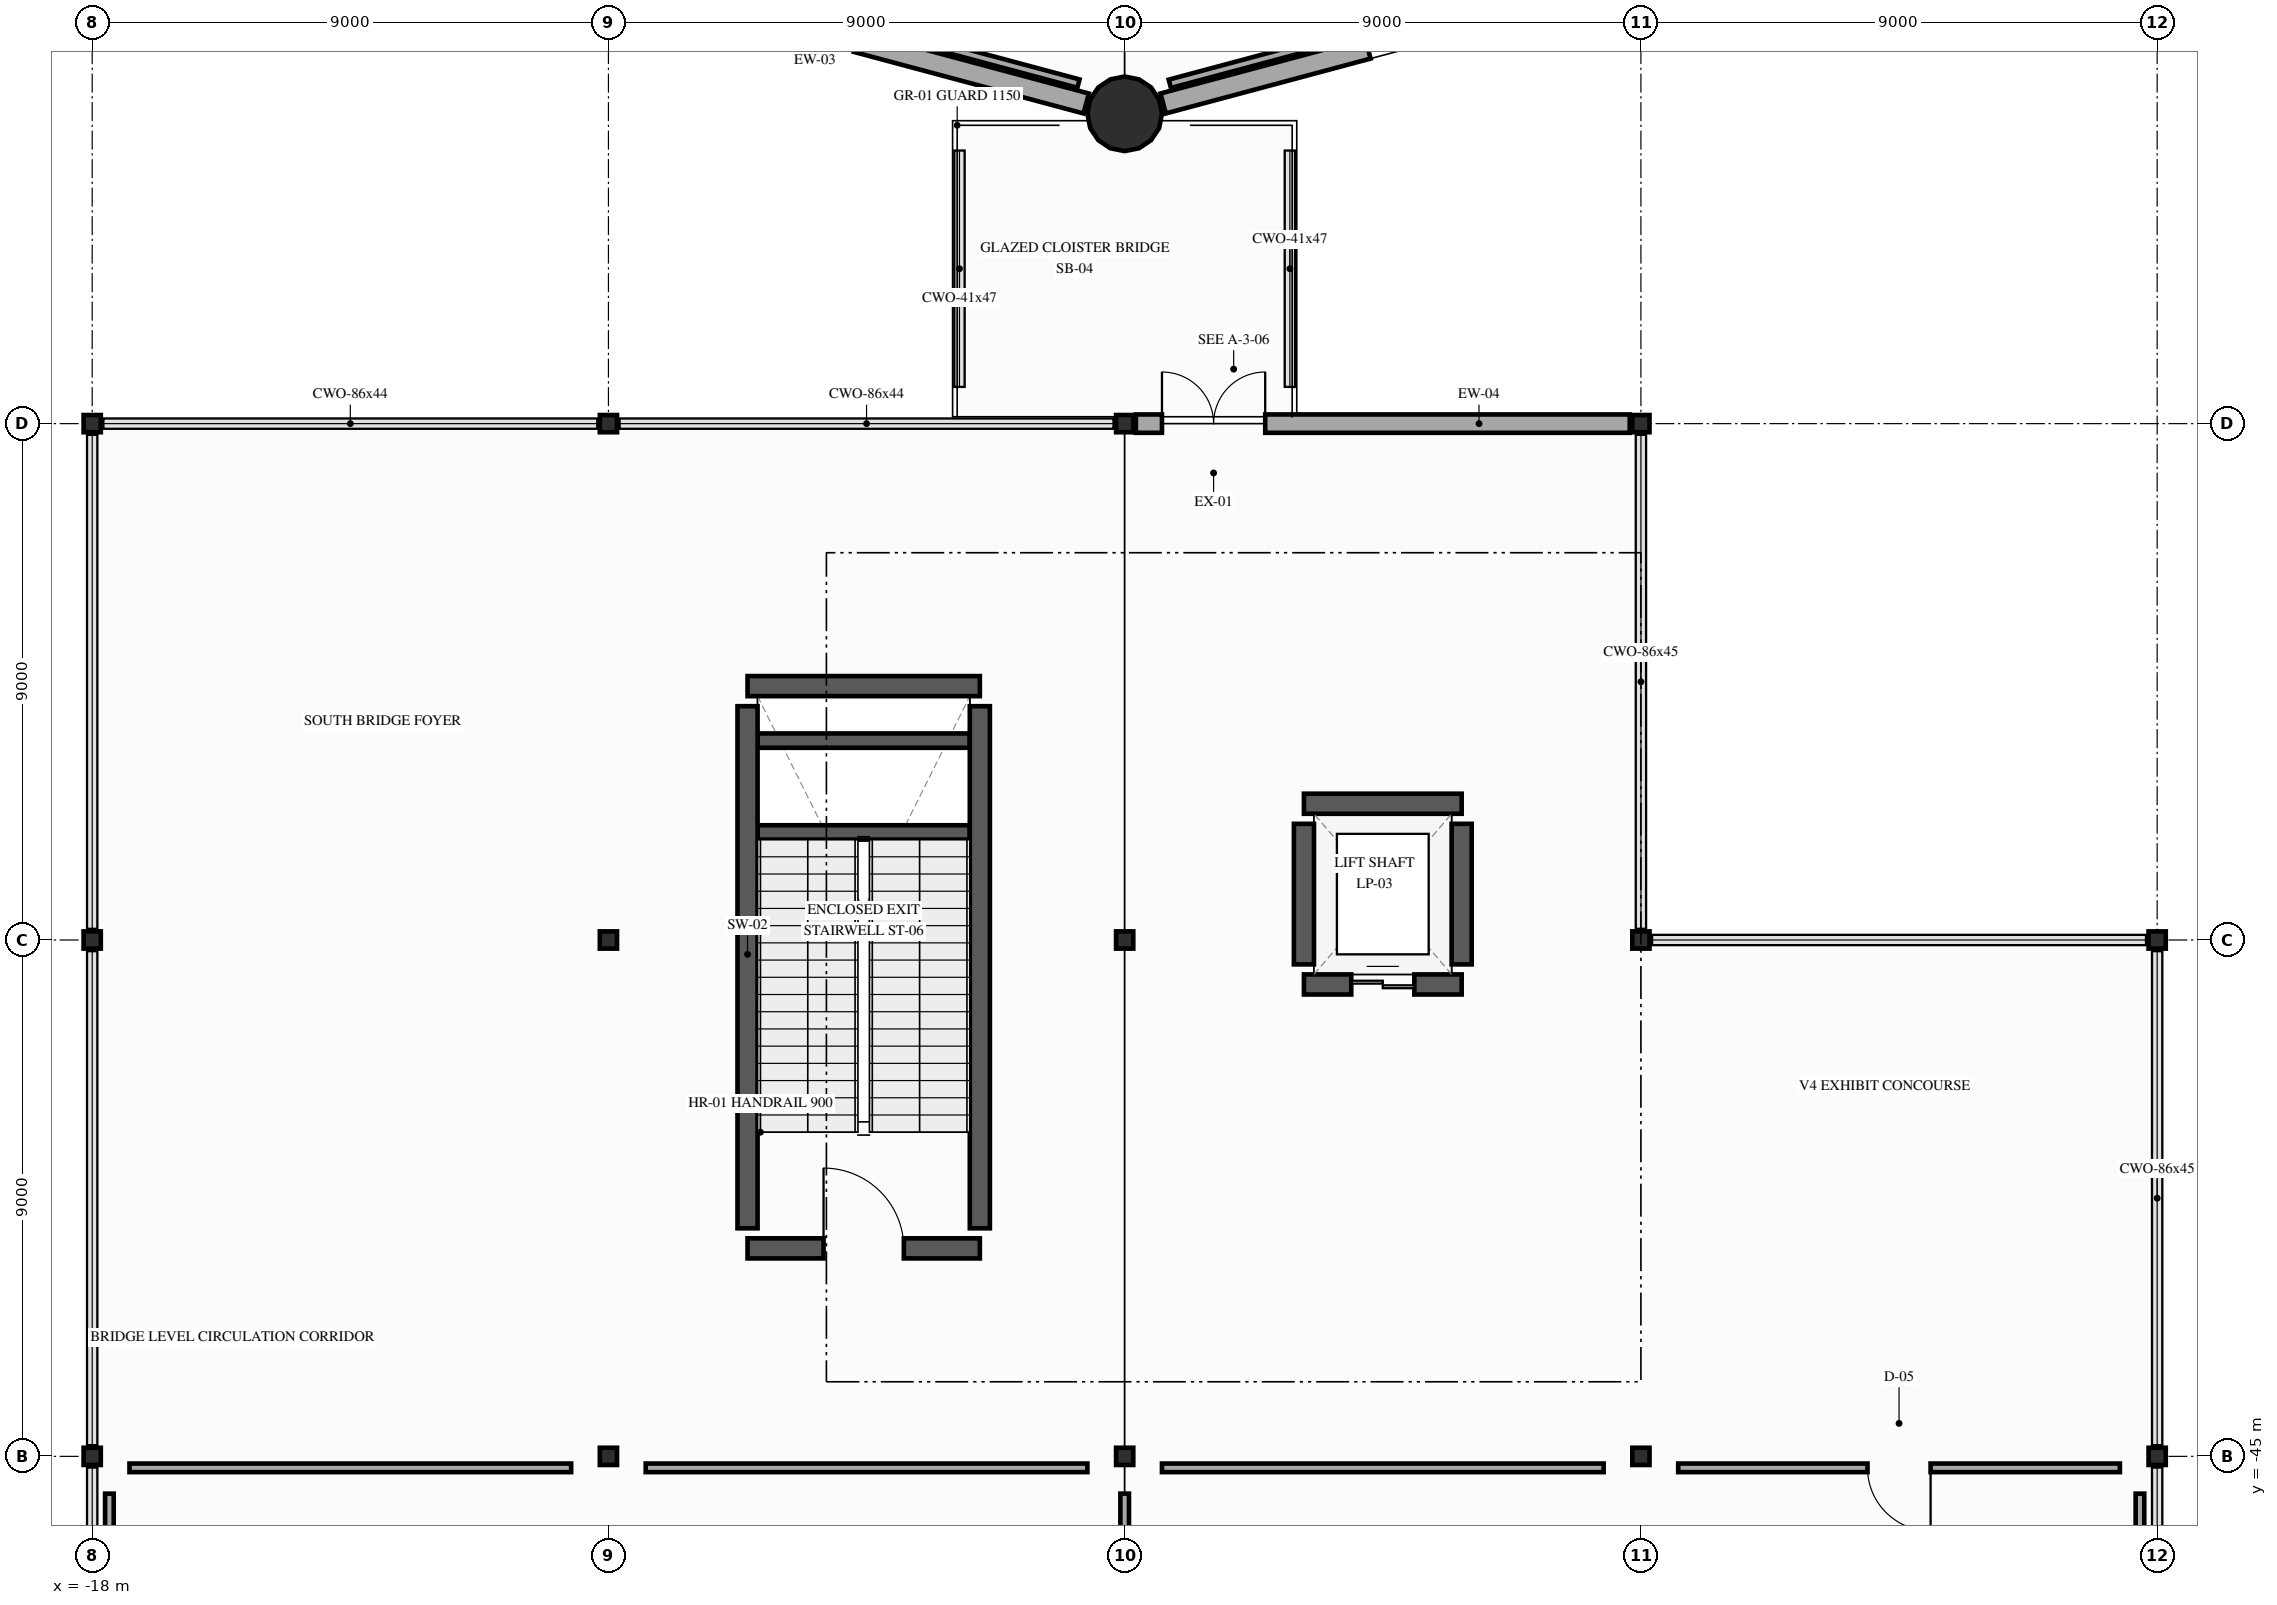
"""IFC4 building model, lengths in metres.
Left out: names, types, materials, properties, quantities, classifications, styles, units other than length and angle.
Written with IfcOpenShell. Run it as: python <this file> out.ifc"""

import sys

from ifc_helpers import new_model, si_unit, direction, frame, frame_2d, origin, origin_2d, place, context, subcontext, project, spatial, rectangle, circle, i_section, extrude, element, fill, save


model = new_model("IFC4")
c1 = context("Model", 3, precision=1e-05, world=origin(), true_north=direction((0.0, 1.0)))
c2 = subcontext(c1, "Body", "Model", "MODEL_VIEW")
j1 = project(units=[si_unit("LENGTHUNIT", "METRE"), si_unit("PLANEANGLEUNIT", "RADIAN")], contexts=[c1])
p1 = place(None, origin())
s1 = spatial("IfcSite", under=j1, at=p1, CompositionType="ELEMENT")
p2 = place(p1, origin())
s2 = spatial("IfcBuilding", under=s1, at=p2, CompositionType="ELEMENT")
p3 = place(p2, frame((0.0, 0.0, 10.8)))
s3 = spatial("IfcBuildingStorey", under=s2, at=p3, CompositionType="ELEMENT", Elevation=10.8)
p4 = place(p3, frame((0.0, -21.6, 0.0), z_axis=(0.0, 0.0, 1.0), x_axis=(0.0, -1.0, 0.0)))
e1 = element("IfcColumn", 1, at=p4, inside=s3, PredefinedType="COLUMN", context=c2, shape_type="SweptSolid", body=[
    extrude(circle(Radius=0.65, at=origin_2d()), origin(), (0.0, 0.0, 1.0), 5.4),
])
for number, where, z_axis, x_axis in (
    (2, (-18.0, -45.0, 0.0), (0.0, 0.0, 1.0), (1.0, 0.0, 0.0)),
    (3, (-18.0, -36.0, 0.0), (0.0, 0.0, 1.0), (1.0, 0.0, 0.0)),
    (4, (-18.0, -27.0, 0.0), (0.0, 0.0, 1.0), (1.0, 0.0, 0.0)),
    (5, (-9.0, -45.0, 0.0), (0.0, 0.0, 1.0), (1.0, 0.0, 0.0)),
    (6, (-9.0, -36.0, 0.0), (0.0, 0.0, 1.0), (1.0, 0.0, 0.0)),
    (7, (-9.0, -27.0, 0.0), (0.0, 0.0, 1.0), (1.0, 0.0, 0.0)),
    (8, (0.0, -45.0, 0.0), (0.0, 0.0, 1.0), (1.0, 0.0, 0.0)),
    (9, (0.0, -36.0, 0.0), (0.0, 0.0, 1.0), (1.0, 0.0, 0.0)),
    (10, (0.0, -27.0, 0.0), (0.0, 0.0, 1.0), (1.0, 0.0, 0.0)),
    (11, (9.0, -45.0, 0.0), (0.0, 0.0, 1.0), (1.0, 0.0, 0.0)),
    (12, (9.0, -36.0, 0.0), (0.0, 0.0, 1.0), (1.0, 0.0, 0.0)),
    (13, (9.0, -27.0, 0.0), (0.0, 0.0, 1.0), (1.0, 0.0, 0.0)),
    (14, (18.0, -45.0, 0.0), (0.0, 0.0, 1.0), (1.0, 0.0, 0.0)),
    (15, (18.0, -36.0, 0.0), (0.0, 0.0, 1.0), (1.0, 0.0, 0.0)),
):
    element("IfcColumn", number, at=place(p3, frame(where, z_axis=z_axis, x_axis=x_axis)), inside=s3, PredefinedType="COLUMN", context=c2, shape_type="SweptSolid", body=[
        extrude(i_section(OverallWidth=0.3, OverallDepth=0.3, WebThickness=0.01, FlangeThickness=0.015, FilletRadius=0.018, at=origin_2d()), origin(), (0.0, 0.0, 1.0), 5.4),
    ])
p5 = place(p3, frame((-0.671, -21.42, 0.0), z_axis=(0.0, 0.0, 1.0), x_axis=(-0.965934251614, 0.258787599316, 0.0)))
e16 = element("IfcWall", 16, at=p5, inside=s3, PredefinedType="SOLIDWALL", context=c2, shape_type="SweptSolid", body=[
    extrude(rectangle(XDim=9.792, YDim=0.36, at=frame_2d((4.896, 0.0))), origin(), (0.0, 0.0, 1.0), 4.395),
])
p6 = place(p5, frame((4.146, 0.0, 0.9)))
e17 = element("IfcOpeningElement", 17, at=p6, cuts=e16, PredefinedType="OPENING", context=c2, shape_type="SweptSolid", body=[
    extrude(rectangle(XDim=1.5, YDim=2.4, at=frame_2d((0.75, 1.2))), frame((0.0, 0.19, 0.0), z_axis=(0.0, -1.0, 0.0), x_axis=(1.0, 0.0, 0.0)), (0.0, 0.0, 1.0), 0.38),
])
p7 = place(p3, frame((10.129, -18.886, 0.0), z_axis=(0.0, 0.0, 1.0), x_axis=(-0.965934251614, -0.258787599316, 0.0)))
e18 = element("IfcWall", 18, at=p7, inside=s3, PredefinedType="SOLIDWALL", context=c2, shape_type="SweptSolid", body=[
    extrude(rectangle(XDim=9.792, YDim=0.36, at=frame_2d((4.896, 0.0))), origin(), (0.0, 0.0, 1.0), 4.395),
])
p8 = place(p7, frame((3.696, 0.0, 0.9)))
e19 = element("IfcOpeningElement", 19, at=p8, cuts=e18, PredefinedType="OPENING", context=c2, shape_type="SweptSolid", body=[
    extrude(rectangle(XDim=2.4, YDim=2.4, at=frame_2d((1.2, 1.2))), frame((0.0, 0.19, 0.0), z_axis=(0.0, -1.0, 0.0), x_axis=(1.0, 0.0, 0.0)), (0.0, 0.0, 1.0), 0.38),
])
p9 = place(p3, frame((0.195, -27.0, 0.0), z_axis=(0.0, 0.0, 1.0), x_axis=(1.0, 0.0, 0.0)))
e20 = element("IfcWall", 20, at=p9, inside=s3, PredefinedType="SOLIDWALL", context=c2, shape_type="SweptSolid", body=[
    extrude(rectangle(XDim=8.61, YDim=0.32, at=frame_2d((4.305, 0.0))), origin(), (0.0, 0.0, 1.0), 4.447),
])
p10 = place(p9, frame((0.455, 0.0, 0.0)))
e21 = element("IfcOpeningElement", 21, at=p10, cuts=e20, PredefinedType="OPENING", context=c2, shape_type="SweptSolid", body=[
    extrude(rectangle(XDim=1.8, YDim=2.2, at=frame_2d((0.9, 1.1))), frame((0.0, 0.17, 0.0), z_axis=(0.0, -1.0, 0.0), x_axis=(1.0, 0.0, 0.0)), (0.0, 0.0, 1.0), 0.34),
])
for number, where, z_axis, x_axis in (
    (22, (-6.4, -34.125, 0.0), (0.0, 0.0, 1.0), (1.0, 0.0, 0.0)),
    (23, (-6.4, -32.525, 0.0), (0.0, 0.0, 1.0), (1.0, 0.0, 0.0)),
):
    element("IfcWall", number, at=place(p3, frame(where, z_axis=z_axis, x_axis=x_axis)), inside=s3, PredefinedType="SHEAR", context=c2, shape_type="SweptSolid", body=[
        extrude(rectangle(XDim=3.7, YDim=0.25, at=frame_2d((1.85, 0.0))), origin(), (0.0, 0.0, 1.0), 2.5),
    ])
p11 = place(p3, frame((-6.575, -41.375, 0.0), z_axis=(0.0, 0.0, 1.0), x_axis=(1.0, 0.0, 0.0)))
e24 = element("IfcWall", 24, at=p11, inside=s3, PredefinedType="SHEAR", context=c2, shape_type="SweptSolid", body=[
    extrude(rectangle(XDim=4.05, YDim=0.35, at=frame_2d((2.025, 0.0))), origin(), (0.0, 0.0, 1.0), 5.16),
])
p12 = place(p11, frame((1.325, 0.0, 0.0)))
e25 = element("IfcOpeningElement", 25, at=p12, cuts=e24, PredefinedType="OPENING", context=c2, shape_type="SweptSolid", body=[
    extrude(rectangle(XDim=1.4, YDim=2.2, at=frame_2d((0.7, 1.1))), frame((0.0, 0.185, 0.0), z_axis=(0.0, -1.0, 0.0), x_axis=(1.0, 0.0, 0.0)), (0.0, 0.0, 1.0), 0.37),
])
p13 = place(p3, frame((-6.575, -31.575, 0.0), z_axis=(0.0, 0.0, 1.0), x_axis=(1.0, 0.0, 0.0)))
e26 = element("IfcWall", 26, at=p13, inside=s3, PredefinedType="SHEAR", context=c2, shape_type="SweptSolid", body=[
    extrude(rectangle(XDim=4.05, YDim=0.35, at=frame_2d((2.025, 0.0))), origin(), (0.0, 0.0, 1.0), 5.16),
])
for number, where, z_axis, x_axis in (
    (27, (-6.575, -41.025, 0.0), (0.0, 0.0, 1.0), (0.0, 1.0, 0.0)),
    (28, (-2.525, -41.025, 0.0), (0.0, 0.0, 1.0), (0.0, 1.0, 0.0)),
):
    element("IfcWall", number, at=place(p3, frame(where, z_axis=z_axis, x_axis=x_axis)), inside=s3, PredefinedType="SHEAR", context=c2, shape_type="SweptSolid", body=[
        extrude(rectangle(XDim=9.1, YDim=0.35, at=frame_2d((4.55, 0.0))), origin(), (0.0, 0.0, 1.0), 5.16),
    ])
p14 = place(p3, frame((3.125, -36.775, 0.0), z_axis=(0.0, 0.0, 1.0), x_axis=(1.0, 0.0, 0.0)))
e29 = element("IfcWall", 29, at=p14, inside=s3, PredefinedType="SHEAR", context=c2, shape_type="SweptSolid", body=[
    extrude(rectangle(XDim=2.75, YDim=0.35, at=frame_2d((1.375, 0.0))), origin(), (0.0, 0.0, 1.0), 5.16),
])
p15 = place(p14, frame((0.825, 0.0, 0.0)))
e30 = element("IfcOpeningElement", 30, at=p15, cuts=e29, PredefinedType="OPENING", context=c2, shape_type="SweptSolid", body=[
    extrude(rectangle(XDim=1.1, YDim=2.2, at=frame_2d((0.55, 1.1))), frame((0.0, 0.185, 0.0), z_axis=(0.0, -1.0, 0.0), x_axis=(1.0, 0.0, 0.0)), (0.0, 0.0, 1.0), 0.37),
])
p16 = place(p3, frame((5.875, -33.625, 0.0), z_axis=(0.0, 0.0, 1.0), x_axis=(-1.0, 0.0, 0.0)))
e31 = element("IfcWall", 31, at=p16, inside=s3, PredefinedType="SHEAR", context=c2, shape_type="SweptSolid", body=[
    extrude(rectangle(XDim=2.75, YDim=0.35, at=frame_2d((1.375, 0.0))), origin(), (0.0, 0.0, 1.0), 5.16),
])
for number, where, z_axis, x_axis in (
    (32, (3.125, -36.425, 0.0), (0.0, 0.0, 1.0), (0.0, 1.0, 0.0)),
    (33, (5.875, -36.425, 0.0), (0.0, 0.0, 1.0), (0.0, 1.0, 0.0)),
):
    element("IfcWall", number, at=place(p3, frame(where, z_axis=z_axis, x_axis=x_axis)), inside=s3, PredefinedType="SHEAR", context=c2, shape_type="SweptSolid", body=[
        extrude(rectangle(XDim=2.45, YDim=0.35, at=frame_2d((1.225, 0.0))), origin(), (0.0, 0.0, 1.0), 5.16),
    ])
p17 = place(p3, frame((-10.04, -18.599, 0.0), z_axis=(0.0, 0.0, 1.0), x_axis=(0.965936310931, -0.258779912716, 0.0)))
e34 = element("IfcWall", 34, at=p17, inside=s3, PredefinedType="PARTITIONING", context=c2, shape_type="SweptSolid", body=[
    extrude(rectangle(XDim=9.56, YDim=0.15, at=frame_2d((4.78, 0.0))), origin(), (0.0, 0.0, 1.0), 4.395),
])
p18 = place(p3, frame((0.787, -21.077, 0.0), z_axis=(0.0, 0.0, 1.0), x_axis=(0.965965793981, 0.258669837549, 0.0)))
e35 = element("IfcWall", 35, at=p18, inside=s3, PredefinedType="PARTITIONING", context=c2, shape_type="SweptSolid", body=[
    extrude(rectangle(XDim=9.579, YDim=0.15, at=frame_2d((4.79, 0.0))), origin(), (0.0, 0.0, 1.0), 4.395),
])
p19 = place(p3, frame((0.0, -55.15, 0.0), z_axis=(0.0, 0.0, 1.0), x_axis=(0.0, 1.0, 0.0)))
e36 = element("IfcWall", 36, at=p19, inside=s3, PredefinedType="PARTITIONING", context=c2, shape_type="SweptSolid", body=[
    extrude(rectangle(XDim=9.5, YDim=0.15, at=frame_2d((4.75, 0.0))), origin(), (0.0, 0.0, 1.0), 4.535),
])
p20 = place(p19, frame((3.85, 0.0, 0.0)))
e37 = element("IfcOpeningElement", 37, at=p20, cuts=e36, PredefinedType="OPENING", context=c2, shape_type="SweptSolid", body=[
    extrude(rectangle(XDim=1.8, YDim=2.3, at=frame_2d((0.9, 1.15))), frame((0.0, 0.085, 0.0), z_axis=(0.0, -1.0, 0.0), x_axis=(1.0, 0.0, 0.0)), (0.0, 0.0, 1.0), 0.17),
])
for number, where, z_axis, x_axis in (
    (38, (-0.65, -45.2, 0.0), (0.0, 0.0, 1.0), (-1.0, 0.0, 0.0)),
    (39, (-9.65, -45.2, 0.0), (0.0, 0.0, 1.0), (-1.0, 0.0, 0.0)),
):
    element("IfcWall", number, at=place(p3, frame(where, z_axis=z_axis, x_axis=x_axis)), inside=s3, PredefinedType="PARTITIONING", context=c2, shape_type="SweptSolid", body=[
        extrude(rectangle(XDim=7.7, YDim=0.15, at=frame_2d((3.85, 0.0))), origin(), (0.0, 0.0, 1.0), 4.447),
    ])
for number, where, z_axis, x_axis in (
    (40, (-17.7, -45.65, 0.0), (0.0, 0.0, 1.0), (0.0, -1.0, 0.0)),
    (41, (17.7, -55.15, 0.0), (0.0, 0.0, 1.0), (0.0, 1.0, 0.0)),
):
    element("IfcWall", number, at=place(p3, frame(where, z_axis=z_axis, x_axis=x_axis)), inside=s3, PredefinedType="PARTITIONING", context=c2, shape_type="SweptSolid", body=[
        extrude(rectangle(XDim=9.5, YDim=0.15, at=frame_2d((4.75, 0.0))), origin(), (0.0, 0.0, 1.0), 4.535),
    ])
p21 = place(p3, frame((17.35, -45.2, 0.0), z_axis=(0.0, 0.0, 1.0), x_axis=(-1.0, 0.0, 0.0)))
e42 = element("IfcWall", 42, at=p21, inside=s3, PredefinedType="PARTITIONING", context=c2, shape_type="SweptSolid", body=[
    extrude(rectangle(XDim=7.7, YDim=0.15, at=frame_2d((3.85, 0.0))), origin(), (0.0, 0.0, 1.0), 4.447),
])
p22 = place(p21, frame((3.3, 0.0, 0.0)))
e43 = element("IfcOpeningElement", 43, at=p22, cuts=e42, PredefinedType="OPENING", context=c2, shape_type="SweptSolid", body=[
    extrude(rectangle(XDim=1.1, YDim=2.15, at=frame_2d((0.55, 1.075))), frame((0.0, 0.085, 0.0), z_axis=(0.0, -1.0, 0.0), x_axis=(1.0, 0.0, 0.0)), (0.0, 0.0, 1.0), 0.17),
])
p23 = place(p3, frame((8.35, -45.2, 0.0), z_axis=(0.0, 0.0, 1.0), x_axis=(-1.0, 0.0, 0.0)))
e44 = element("IfcWall", 44, at=p23, inside=s3, PredefinedType="PARTITIONING", context=c2, shape_type="SweptSolid", body=[
    extrude(rectangle(XDim=7.7, YDim=0.15, at=frame_2d((3.85, 0.0))), origin(), (0.0, 0.0, 1.0), 4.447),
])
p24 = place(p10, origin())
e45 = element("IfcDoor", 45, at=p24, inside=s3, OperationType="DOUBLE_DOOR_SINGLE_SWING", PredefinedType="DOOR", context=c2, shape_type="SweptSolid", body=[
    extrude(rectangle(XDim=1.8, YDim=2.2, at=frame_2d((0.9, 1.1))), frame((0.0, 0.025, 0.0), z_axis=(0.0, -1.0, 0.0), x_axis=(1.0, 0.0, 0.0)), (0.0, 0.0, 1.0), 0.05),
])
fill(e21, e45)
p25 = place(p12, origin())
e46 = element("IfcDoor", 46, at=p25, inside=s3, OperationType="SINGLE_SWING_LEFT", PredefinedType="DOOR", context=c2, shape_type="SweptSolid", body=[
    extrude(rectangle(XDim=1.4, YDim=2.2, at=frame_2d((0.7, 1.1))), frame((0.0, 0.025, 0.0), z_axis=(0.0, -1.0, 0.0), x_axis=(1.0, 0.0, 0.0)), (0.0, 0.0, 1.0), 0.05),
])
fill(e25, e46)
p26 = place(p15, origin())
e47 = element("IfcDoor", 47, at=p26, inside=s3, OperationType="DOUBLE_DOOR_SLIDING", PredefinedType="DOOR", context=c2, shape_type="SweptSolid", body=[
    extrude(rectangle(XDim=1.1, YDim=2.2, at=frame_2d((0.55, 1.1))), frame((0.0, 0.025, 0.0), z_axis=(0.0, -1.0, 0.0), x_axis=(1.0, 0.0, 0.0)), (0.0, 0.0, 1.0), 0.05),
])
fill(e30, e47)
p27 = place(p22, origin())
e48 = element("IfcDoor", 48, at=p27, inside=s3, OperationType="SINGLE_SWING_LEFT", PredefinedType="DOOR", context=c2, shape_type="SweptSolid", body=[
    extrude(rectangle(XDim=1.1, YDim=2.15, at=frame_2d((0.55, 1.075))), frame((0.0, 0.025, 0.0), z_axis=(0.0, -1.0, 0.0), x_axis=(1.0, 0.0, 0.0)), (0.0, 0.0, 1.0), 0.05),
])
fill(e43, e48)
save(model, sys.argv[1])
